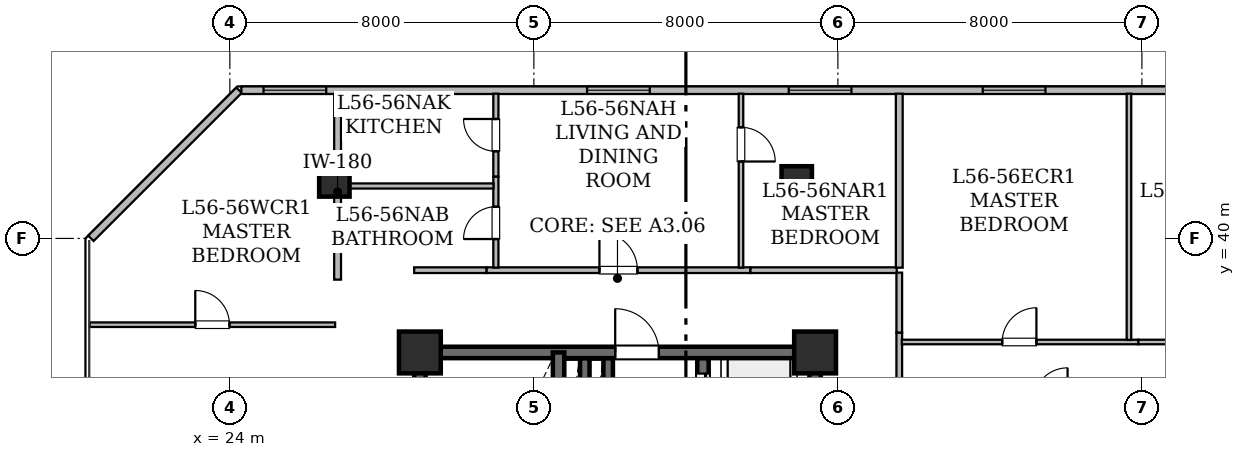
"""IFC4 building model, lengths in metres.
Left out: names, types, materials, properties, quantities, classifications, styles, units other than length and angle.
Written with IfcOpenShell. Run it as: python <this file> out.ifc"""

import sys

from ifc_helpers import new_model, si_unit, direction, frame, frame_2d, origin, origin_2d, place, context, subcontext, project, spatial, rectangle, hollow_rectangle, extrude, element, fill, save


model = new_model("IFC4")
c1 = context("Model", 3, precision=1e-05, world=origin(), true_north=direction((0.0, 1.0)))
c2 = subcontext(c1, "Body", "Model", "MODEL_VIEW")
j1 = project(units=[si_unit("LENGTHUNIT", "METRE"), si_unit("PLANEANGLEUNIT", "RADIAN")], contexts=[c1])
p1 = place(None, origin())
s1 = spatial("IfcSite", under=j1, at=p1, CompositionType="ELEMENT")
p2 = place(p1, origin())
s2 = spatial("IfcBuilding", under=s1, at=p2, CompositionType="ELEMENT")
p3 = place(p2, frame((0.0, 0.0, 220.85)))
s3 = spatial("IfcBuildingStorey", under=s2, at=p3, CompositionType="ELEMENT", Elevation=220.85)
for number, where, z_axis, x_axis in (
    (1, (29.0, 37.0, 0.0), (0.0, 0.0, 1.0), (1.0, 0.0, 0.0)),
    (2, (39.4, 37.0, 0.0), (0.0, 0.0, 1.0), (1.0, 0.0, 0.0)),
):
    element("IfcColumn", number, at=place(p3, frame(where, z_axis=z_axis, x_axis=x_axis)), inside=s3, PredefinedType="COLUMN", context=c2, shape_type="SweptSolid", body=[
        extrude(hollow_rectangle(XDim=1.1, YDim=1.1, WallThickness=0.055, at=origin_2d()), origin(), (0.0, 0.0, 1.0), 3.65),
    ])
for number, where, z_axis, x_axis in (
    (3, (26.75, 41.5, 0.0), (0.0, 0.0, 1.0), (1.0, 0.0, 0.0)),
    (4, (38.917, 41.5, 0.0), (0.0, 0.0, 1.0), (1.0, 0.0, 0.0)),
):
    element("IfcColumn", number, at=place(p3, frame(where, z_axis=z_axis, x_axis=x_axis)), inside=s3, PredefinedType="COLUMN", context=c2, shape_type="SweptSolid", body=[
        extrude(hollow_rectangle(XDim=0.8, YDim=0.8, WallThickness=0.04, at=origin_2d()), origin(), (0.0, 0.0, 1.0), 3.65),
    ])
p4 = place(p3, frame((20.344, 40.003, 0.0), z_axis=(0.0, 0.0, 1.0), x_axis=(0.707106781187, 0.707106781187, 0.0)))
e5 = element("IfcWall", 5, at=p4, inside=s3, PredefinedType="STANDARD", context=c2, shape_type="SweptSolid", body=[
    extrude(rectangle(XDim=5.511, YDim=0.2, at=frame_2d((2.756, 0.0))), origin(), (0.0, 0.0, 1.0), 3.43),
])
p5 = place(p3, frame((24.302, 43.9, 0.0), z_axis=(0.0, 0.0, 1.0), x_axis=(1.0, 0.0, 0.0)))
e6 = element("IfcWall", 6, at=p5, inside=s3, PredefinedType="STANDARD", context=c2, shape_type="SweptSolid", body=[
    extrude(rectangle(XDim=41.457, YDim=0.2, at=frame_2d((20.729, 0.0))), origin(), (0.0, 0.0, 1.0), 3.43),
])
p6 = place(p5, frame((0.584, 0.0, 0.85)))
e7 = element("IfcOpeningElement", 7, at=p6, cuts=e6, PredefinedType="OPENING", context=c2, shape_type="SweptSolid", body=[
    extrude(rectangle(XDim=1.65, YDim=1.55, at=frame_2d((0.825, 0.775))), frame((0.0, 0.11, 0.0), z_axis=(0.0, -1.0, 0.0), x_axis=(1.0, 0.0, 0.0)), (0.0, 0.0, 1.0), 0.22),
])
p7 = place(p5, frame((9.098, 0.0, 0.85)))
e8 = element("IfcOpeningElement", 8, at=p7, cuts=e6, PredefinedType="OPENING", context=c2, shape_type="SweptSolid", body=[
    extrude(rectangle(XDim=1.65, YDim=1.55, at=frame_2d((0.825, 0.775))), frame((0.0, 0.11, 0.0), z_axis=(0.0, -1.0, 0.0), x_axis=(1.0, 0.0, 0.0)), (0.0, 0.0, 1.0), 0.22),
])
p8 = place(p5, frame((14.405, 0.0, 0.85)))
e9 = element("IfcOpeningElement", 9, at=p8, cuts=e6, PredefinedType="OPENING", context=c2, shape_type="SweptSolid", body=[
    extrude(rectangle(XDim=1.65, YDim=1.55, at=frame_2d((0.825, 0.775))), frame((0.0, 0.11, 0.0), z_axis=(0.0, -1.0, 0.0), x_axis=(1.0, 0.0, 0.0)), (0.0, 0.0, 1.0), 0.22),
])
p9 = place(p5, frame((19.51, 0.0, 0.85)))
e10 = element("IfcOpeningElement", 10, at=p9, cuts=e6, PredefinedType="OPENING", context=c2, shape_type="SweptSolid", body=[
    extrude(rectangle(XDim=1.65, YDim=1.55, at=frame_2d((0.825, 0.775))), frame((0.0, 0.11, 0.0), z_axis=(0.0, -1.0, 0.0), x_axis=(1.0, 0.0, 0.0)), (0.0, 0.0, 1.0), 0.22),
])
p10 = place(p5, frame((25.992, 0.0, 0.85)))
e11 = element("IfcOpeningElement", 11, at=p10, cuts=e6, PredefinedType="OPENING", context=c2, shape_type="SweptSolid", body=[
    extrude(rectangle(XDim=1.65, YDim=1.55, at=frame_2d((0.825, 0.775))), frame((0.0, 0.11, 0.0), z_axis=(0.0, -1.0, 0.0), x_axis=(1.0, 0.0, 0.0)), (0.0, 0.0, 1.0), 0.22),
])
p11 = place(p5, frame((31.5, 0.0, 0.85)))
e12 = element("IfcOpeningElement", 12, at=p11, cuts=e6, PredefinedType="OPENING", context=c2, shape_type="SweptSolid", body=[
    extrude(rectangle(XDim=1.65, YDim=1.55, at=frame_2d((0.825, 0.775))), frame((0.0, 0.11, 0.0), z_axis=(0.0, -1.0, 0.0), x_axis=(1.0, 0.0, 0.0)), (0.0, 0.0, 1.0), 0.22),
])
p12 = place(p5, frame((36.066, 0.0, 0.85)))
e13 = element("IfcOpeningElement", 13, at=p12, cuts=e6, PredefinedType="OPENING", context=c2, shape_type="SweptSolid", body=[
    extrude(rectangle(XDim=1.65, YDim=1.55, at=frame_2d((0.825, 0.775))), frame((0.0, 0.11, 0.0), z_axis=(0.0, -1.0, 0.0), x_axis=(1.0, 0.0, 0.0)), (0.0, 0.0, 1.0), 0.22),
])
p13 = place(p3, frame((29.0, 28.0, 0.0), z_axis=(0.0, 0.0, 1.0), x_axis=(0.0, 1.0, 0.0)))
e14 = element("IfcWall", 14, at=p13, inside=s3, PredefinedType="SHEAR", context=c2, shape_type="SweptSolid", body=[
    extrude(rectangle(XDim=9.0, YDim=0.3, at=frame_2d((4.5, 0.0))), origin(), (0.0, 0.0, 1.0), 3.43),
])
p14 = place(p3, frame((29.0, 37.0, 0.0), z_axis=(0.0, 0.0, 1.0), x_axis=(1.0, 0.0, 0.0)))
e15 = element("IfcWall", 15, at=p14, inside=s3, PredefinedType="SHEAR", context=c2, shape_type="SweptSolid", body=[
    extrude(rectangle(XDim=10.4, YDim=0.3, at=frame_2d((5.2, 0.0))), origin(), (0.0, 0.0, 1.0), 3.43),
])
p15 = place(p14, frame((5.14, 0.0, 0.0)))
e16 = element("IfcOpeningElement", 16, at=p15, cuts=e15, PredefinedType="OPENING", context=c2, shape_type="SweptSolid", body=[
    extrude(rectangle(XDim=1.15, YDim=2.2, at=frame_2d((0.575, 1.1))), frame((0.0, 0.16, 0.0), z_axis=(0.0, -1.0, 0.0), x_axis=(1.0, 0.0, 0.0)), (0.0, 0.0, 1.0), 0.32),
])
p16 = place(p3, frame((39.4, 24.4, 0.0), z_axis=(0.0, 0.0, 1.0), x_axis=(0.0, 1.0, 0.0)))
e17 = element("IfcWall", 17, at=p16, inside=s3, PredefinedType="SHEAR", context=c2, shape_type="SweptSolid", body=[
    extrude(rectangle(XDim=12.6, YDim=0.3, at=frame_2d((6.3, 0.0))), origin(), (0.0, 0.0, 1.0), 3.43),
])
p17 = place(p3, frame((32.65, 28.0, 0.0), z_axis=(0.0, 0.0, 1.0), x_axis=(0.0, 1.0, 0.0)))
e18 = element("IfcWall", 18, at=p17, inside=s3, PredefinedType="SHEAR", context=c2, shape_type="SweptSolid", body=[
    extrude(rectangle(XDim=9.0, YDim=0.3, at=frame_2d((4.5, 0.0))), origin(), (0.0, 0.0, 1.0), 3.43),
])
p18 = place(p17, frame((0.72, 0.0, 0.0)))
e19 = element("IfcOpeningElement", 19, at=p18, cuts=e18, PredefinedType="OPENING", context=c2, shape_type="SweptSolid", body=[
    extrude(rectangle(XDim=1.0, YDim=2.15, at=frame_2d((0.5, 1.075))), frame((0.0, 0.16, 0.0), z_axis=(0.0, -1.0, 0.0), x_axis=(1.0, 0.0, 0.0)), (0.0, 0.0, 1.0), 0.32),
])
p19 = place(p3, frame((36.45, 31.3, 0.0), z_axis=(0.0, 0.0, 1.0), x_axis=(0.0, 1.0, 0.0)))
e20 = element("IfcWall", 20, at=p19, inside=s3, PredefinedType="SHEAR", context=c2, shape_type="SweptSolid", body=[
    extrude(rectangle(XDim=5.546, YDim=0.3, at=frame_2d((2.773, 0.0))), origin(), (0.0, 0.0, 1.0), 3.43),
])
p20 = place(p19, frame((0.12, 0.0, 0.0)))
e21 = element("IfcOpeningElement", 21, at=p20, cuts=e20, PredefinedType="OPENING", context=c2, shape_type="SweptSolid", body=[
    extrude(rectangle(XDim=1.05, YDim=2.15, at=frame_2d((0.525, 1.075))), frame((0.0, 0.16, 0.0), z_axis=(0.0, -1.0, 0.0), x_axis=(1.0, 0.0, 0.0)), (0.0, 0.0, 1.0), 0.32),
])
p21 = place(p19, frame((2.075, 0.0, 0.0)))
e22 = element("IfcOpeningElement", 22, at=p21, cuts=e20, PredefinedType="OPENING", context=c2, shape_type="SweptSolid", body=[
    extrude(rectangle(XDim=1.05, YDim=2.15, at=frame_2d((0.525, 1.075))), frame((0.0, 0.16, 0.0), z_axis=(0.0, -1.0, 0.0), x_axis=(1.0, 0.0, 0.0)), (0.0, 0.0, 1.0), 0.32),
])
p22 = place(p19, frame((4.095, 0.0, 0.0)))
e23 = element("IfcOpeningElement", 23, at=p22, cuts=e20, PredefinedType="OPENING", context=c2, shape_type="SweptSolid", body=[
    extrude(rectangle(XDim=1.05, YDim=2.15, at=frame_2d((0.525, 1.075))), frame((0.0, 0.16, 0.0), z_axis=(0.0, -1.0, 0.0), x_axis=(1.0, 0.0, 0.0)), (0.0, 0.0, 1.0), 0.32),
])
p23 = place(p3, frame((33.955, 34.025, 0.0), z_axis=(0.0, 0.0, 1.0), x_axis=(0.0, 1.0, 0.0)))
e24 = element("IfcWall", 24, at=p23, inside=s3, PredefinedType="SHEAR", context=c2, shape_type="SweptSolid", body=[
    extrude(rectangle(XDim=2.821, YDim=0.25, at=frame_2d((1.411, 0.0))), origin(), (0.0, 0.0, 1.0), 3.43),
])
p24 = place(p3, frame((33.34, 34.279, 0.0), z_axis=(0.0, 0.0, 1.0), x_axis=(0.0, 1.0, 0.0)))
e25 = element("IfcWall", 25, at=p24, inside=s3, PredefinedType="SHEAR", context=c2, shape_type="SweptSolid", body=[
    extrude(rectangle(XDim=2.567, YDim=0.25, at=frame_2d((1.283, 0.0))), origin(), (0.0, 0.0, 1.0), 3.43),
])
p25 = place(p3, frame((30.751, 39.165, 0.0), z_axis=(0.0, 0.0, 1.0), x_axis=(1.0, 0.0, 0.0)))
e26 = element("IfcWall", 26, at=p25, inside=s3, PredefinedType="STANDARD", context=c2, shape_type="SweptSolid", body=[
    extrude(rectangle(XDim=6.948, YDim=0.15, at=frame_2d((3.474, 0.0))), origin(), (0.0, 0.0, 1.0), 3.43),
])
p26 = place(p25, frame((2.974, 0.0, 0.0)))
e27 = element("IfcOpeningElement", 27, at=p26, cuts=e26, PredefinedType="OPENING", context=c2, shape_type="SweptSolid", body=[
    extrude(rectangle(XDim=1.0, YDim=2.15, at=frame_2d((0.5, 1.075))), frame((0.0, 0.085, 0.0), z_axis=(0.0, -1.0, 0.0), x_axis=(1.0, 0.0, 0.0)), (0.0, 0.0, 1.0), 0.17),
])
p27 = place(p3, frame((28.85, 39.165, 0.0), z_axis=(0.0, 0.0, 1.0), x_axis=(1.0, 0.0, 0.0)))
e28 = element("IfcWall", 28, at=p27, inside=s3, PredefinedType="STANDARD", context=c2, shape_type="SweptSolid", body=[
    extrude(rectangle(XDim=1.901, YDim=0.15, at=frame_2d((0.95, 0.0))), origin(), (0.0, 0.0, 1.0), 3.43),
])
p28 = place(p3, frame((37.699, 39.165, 0.0), z_axis=(0.0, 0.0, 1.0), x_axis=(1.0, 0.0, 0.0)))
e29 = element("IfcWall", 29, at=p28, inside=s3, PredefinedType="STANDARD", context=c2, shape_type="SweptSolid", body=[
    extrude(rectangle(XDim=3.851, YDim=0.15, at=frame_2d((1.926, 0.0))), origin(), (0.0, 0.0, 1.0), 2.725),
])
p29 = place(p3, frame((41.615, 37.524, 0.0), z_axis=(0.0, 0.0, 1.0), x_axis=(0.0, -1.0, 0.0)))
e30 = element("IfcWall", 30, at=p29, inside=s3, PredefinedType="STANDARD", context=c2, shape_type="SweptSolid", body=[
    extrude(rectangle(XDim=1.58, YDim=0.15, at=frame_2d((0.79, 0.0))), origin(), (0.0, 0.0, 1.0), 2.725),
])
p30 = place(p3, frame((41.615, 39.1, 0.0), z_axis=(0.0, 0.0, 1.0), x_axis=(0.0, -1.0, 0.0)))
e31 = element("IfcWall", 31, at=p30, inside=s3, PredefinedType="STANDARD", context=c2, shape_type="SweptSolid", body=[
    extrude(rectangle(XDim=1.576, YDim=0.15, at=frame_2d((0.788, 0.0))), origin(), (0.0, 0.0, 1.0), 2.725),
])
p31 = place(p3, frame((20.31, 37.73, 0.0), z_axis=(0.0, 0.0, 1.0), x_axis=(1.0, 0.0, 0.0)))
e32 = element("IfcWall", 32, at=p31, inside=s3, PredefinedType="PARTITIONING", context=c2, shape_type="SweptSolid", body=[
    extrude(rectangle(XDim=6.46, YDim=0.12, at=frame_2d((3.23, 0.0))), origin(), (0.0, 0.0, 1.0), 2.887),
])
p32 = place(p31, frame((2.78, 0.0, 0.0)))
e33 = element("IfcOpeningElement", 33, at=p32, cuts=e32, PredefinedType="OPENING", context=c2, shape_type="SweptSolid", body=[
    extrude(rectangle(XDim=0.9, YDim=2.1, at=frame_2d((0.45, 1.05))), frame((0.0, 0.07, 0.0), z_axis=(0.0, -1.0, 0.0), x_axis=(1.0, 0.0, 0.0)), (0.0, 0.0, 1.0), 0.14),
])
p33 = place(p3, frame((26.835, 41.629, 0.0), z_axis=(0.0, 0.0, 1.0), x_axis=(0.0, -1.0, 0.0)))
e34 = element("IfcWall", 34, at=p33, inside=s3, PredefinedType="STANDARD", context=c2, shape_type="SweptSolid", body=[
    extrude(rectangle(XDim=2.713, YDim=0.18, at=frame_2d((1.356, 0.0))), origin(), (0.0, 0.0, 1.0), 2.725),
])
p34 = place(p3, frame((26.835, 43.808, 0.0), z_axis=(0.0, 0.0, 1.0), x_axis=(0.0, -1.0, 0.0)))
e35 = element("IfcWall", 35, at=p34, inside=s3, PredefinedType="STANDARD", context=c2, shape_type="SweptSolid", body=[
    extrude(rectangle(XDim=2.179, YDim=0.18, at=frame_2d((1.09, 0.0))), origin(), (0.0, 0.0, 1.0), 2.725),
])
p35 = place(p3, frame((31.0, 39.232, 0.0), z_axis=(0.0, 0.0, 1.0), x_axis=(0.0, 1.0, 0.0)))
e36 = element("IfcWall", 36, at=p35, inside=s3, PredefinedType="PARTITIONING", context=c2, shape_type="SweptSolid", body=[
    extrude(rectangle(XDim=2.397, YDim=0.135, at=frame_2d((1.198, 0.0))), origin(), (0.0, 0.0, 1.0), 2.887),
])
p36 = place(p35, frame((0.752, 0.0, 0.0)))
e37 = element("IfcOpeningElement", 37, at=p36, cuts=e36, PredefinedType="OPENING", context=c2, shape_type="SweptSolid", body=[
    extrude(rectangle(XDim=0.85, YDim=2.1, at=frame_2d((0.425, 1.05))), frame((0.0, 0.077, 0.0), z_axis=(0.0, -1.0, 0.0), x_axis=(1.0, 0.0, 0.0)), (0.0, 0.0, 1.0), 0.155),
])
p37 = place(p3, frame((31.0, 41.629, 0.0), z_axis=(0.0, 0.0, 1.0), x_axis=(0.0, 1.0, 0.0)))
e38 = element("IfcWall", 38, at=p37, inside=s3, PredefinedType="PARTITIONING", context=c2, shape_type="SweptSolid", body=[
    extrude(rectangle(XDim=2.179, YDim=0.135, at=frame_2d((1.09, 0.0))), origin(), (0.0, 0.0, 1.0), 3.43),
])
p38 = place(p37, frame((0.664, 0.0, 0.0)))
e39 = element("IfcOpeningElement", 39, at=p38, cuts=e38, PredefinedType="OPENING", context=c2, shape_type="SweptSolid", body=[
    extrude(rectangle(XDim=0.85, YDim=2.1, at=frame_2d((0.425, 1.05))), frame((0.0, 0.077, 0.0), z_axis=(0.0, -1.0, 0.0), x_axis=(1.0, 0.0, 0.0)), (0.0, 0.0, 1.0), 0.155),
])
p39 = place(p3, frame((37.45, 43.808, 0.0), z_axis=(0.0, 0.0, 1.0), x_axis=(0.0, -1.0, 0.0)))
e40 = element("IfcWall", 40, at=p39, inside=s3, PredefinedType="PARTITIONING", context=c2, shape_type="SweptSolid", body=[
    extrude(rectangle(XDim=4.576, YDim=0.12, at=frame_2d((2.288, 0.0))), origin(), (0.0, 0.0, 1.0), 2.887),
])
p40 = place(p39, frame((0.884, 0.0, 0.0)))
e41 = element("IfcOpeningElement", 41, at=p40, cuts=e40, PredefinedType="OPENING", context=c2, shape_type="SweptSolid", body=[
    extrude(rectangle(XDim=0.9, YDim=2.1, at=frame_2d((0.45, 1.05))), frame((0.0, 0.07, 0.0), z_axis=(0.0, -1.0, 0.0), x_axis=(1.0, 0.0, 0.0)), (0.0, 0.0, 1.0), 0.14),
])
p41 = place(p3, frame((26.917, 41.38, 0.0), z_axis=(0.0, 0.0, 1.0), x_axis=(1.0, 0.0, 0.0)))
e42 = element("IfcWall", 42, at=p41, inside=s3, PredefinedType="PARTITIONING", context=c2, shape_type="SweptSolid", body=[
    extrude(rectangle(XDim=4.022, YDim=0.135, at=frame_2d((2.011, 0.0))), origin(), (0.0, 0.0, 1.0), 2.725),
])
p42 = place(p3, frame((41.615, 43.808, 0.0), z_axis=(0.0, 0.0, 1.0), x_axis=(0.0, -1.0, 0.0)))
e43 = element("IfcWall", 43, at=p42, inside=s3, PredefinedType="STANDARD", context=c2, shape_type="SweptSolid", body=[
    extrude(rectangle(XDim=4.578, YDim=0.18, at=frame_2d((2.289, 0.0))), origin(), (0.0, 0.0, 1.0), 2.887),
])
p43 = place(p3, frame((41.682, 37.275, 0.0), z_axis=(0.0, 0.0, 1.0), x_axis=(1.0, 0.0, 0.0)))
e44 = element("IfcWall", 44, at=p43, inside=s3, PredefinedType="PARTITIONING", context=c2, shape_type="SweptSolid", body=[
    extrude(rectangle(XDim=6.226, YDim=0.12, at=frame_2d((3.113, 0.0))), origin(), (0.0, 0.0, 1.0), 2.725),
])
p44 = place(p43, frame((2.642, 0.0, 0.0)))
e45 = element("IfcOpeningElement", 45, at=p44, cuts=e44, PredefinedType="OPENING", context=c2, shape_type="SweptSolid", body=[
    extrude(rectangle(XDim=0.9, YDim=2.1, at=frame_2d((0.45, 1.05))), frame((0.0, 0.07, 0.0), z_axis=(0.0, -1.0, 0.0), x_axis=(1.0, 0.0, 0.0)), (0.0, 0.0, 1.0), 0.14),
])
p45 = place(p3, frame((47.908, 37.275, 0.0), z_axis=(0.0, 0.0, 1.0), x_axis=(1.0, 0.0, 0.0)))
e46 = element("IfcWall", 46, at=p45, inside=s3, PredefinedType="PARTITIONING", context=c2, shape_type="SweptSolid", body=[
    extrude(rectangle(XDim=6.921, YDim=0.12, at=frame_2d((3.46, 0.0))), origin(), (0.0, 0.0, 1.0), 2.725),
])
p46 = place(p45, frame((2.989, 0.0, 0.0)))
e47 = element("IfcOpeningElement", 47, at=p46, cuts=e46, PredefinedType="OPENING", context=c2, shape_type="SweptSolid", body=[
    extrude(rectangle(XDim=0.9, YDim=2.1, at=frame_2d((0.45, 1.05))), frame((0.0, 0.07, 0.0), z_axis=(0.0, -1.0, 0.0), x_axis=(1.0, 0.0, 0.0)), (0.0, 0.0, 1.0), 0.14),
])
p47 = place(p3, frame((47.659, 43.808, 0.0), z_axis=(0.0, 0.0, 1.0), x_axis=(0.0, -1.0, 0.0)))
e48 = element("IfcWall", 48, at=p47, inside=s3, PredefinedType="PARTITIONING", context=c2, shape_type="SweptSolid", body=[
    extrude(rectangle(XDim=6.479, YDim=0.12, at=frame_2d((3.24, 0.0))), origin(), (0.0, 0.0, 1.0), 2.725),
])
p48 = place(p6, origin())
e49 = element("IfcWindow", 49, at=p48, inside=s3, PartitioningType="SINGLE_PANEL", PredefinedType="WINDOW", context=c2, shape_type="SweptSolid", body=[
    extrude(rectangle(XDim=1.65, YDim=1.55, at=frame_2d((0.825, 0.775))), frame((0.0, 0.03, 0.0), z_axis=(0.0, -1.0, 0.0), x_axis=(1.0, 0.0, 0.0)), (0.0, 0.0, 1.0), 0.06),
])
fill(e7, e49)
p49 = place(p7, origin())
e50 = element("IfcWindow", 50, at=p49, inside=s3, PartitioningType="SINGLE_PANEL", PredefinedType="WINDOW", context=c2, shape_type="SweptSolid", body=[
    extrude(rectangle(XDim=1.65, YDim=1.55, at=frame_2d((0.825, 0.775))), frame((0.0, 0.03, 0.0), z_axis=(0.0, -1.0, 0.0), x_axis=(1.0, 0.0, 0.0)), (0.0, 0.0, 1.0), 0.06),
])
fill(e8, e50)
p50 = place(p8, origin())
e51 = element("IfcWindow", 51, at=p50, inside=s3, PartitioningType="SINGLE_PANEL", PredefinedType="WINDOW", context=c2, shape_type="SweptSolid", body=[
    extrude(rectangle(XDim=1.65, YDim=1.55, at=frame_2d((0.825, 0.775))), frame((0.0, 0.03, 0.0), z_axis=(0.0, -1.0, 0.0), x_axis=(1.0, 0.0, 0.0)), (0.0, 0.0, 1.0), 0.06),
])
fill(e9, e51)
p51 = place(p9, origin())
e52 = element("IfcWindow", 52, at=p51, inside=s3, PartitioningType="SINGLE_PANEL", PredefinedType="WINDOW", context=c2, shape_type="SweptSolid", body=[
    extrude(rectangle(XDim=1.65, YDim=1.55, at=frame_2d((0.825, 0.775))), frame((0.0, 0.03, 0.0), z_axis=(0.0, -1.0, 0.0), x_axis=(1.0, 0.0, 0.0)), (0.0, 0.0, 1.0), 0.06),
])
fill(e10, e52)
p52 = place(p15, origin())
e53 = element("IfcDoor", 53, at=p52, inside=s3, OperationType="SINGLE_SWING_LEFT", PredefinedType="DOOR", context=c2, shape_type="SweptSolid", body=[
    extrude(rectangle(XDim=1.15, YDim=2.2, at=frame_2d((0.575, 1.1))), frame((0.0, 0.025, 0.0), z_axis=(0.0, -1.0, 0.0), x_axis=(1.0, 0.0, 0.0)), (0.0, 0.0, 1.0), 0.05),
])
fill(e16, e53)
p53 = place(p22, origin())
e54 = element("IfcDoor", 54, at=p53, inside=s3, OperationType="SLIDING_TO_LEFT", PredefinedType="DOOR", context=c2, shape_type="SweptSolid", body=[
    extrude(rectangle(XDim=1.05, YDim=2.15, at=frame_2d((0.525, 1.075))), frame((0.0, 0.025, 0.0), z_axis=(0.0, -1.0, 0.0), x_axis=(1.0, 0.0, 0.0)), (0.0, 0.0, 1.0), 0.05),
])
fill(e23, e54)
p54 = place(p26, origin())
e55 = element("IfcDoor", 55, at=p54, inside=s3, OperationType="SINGLE_SWING_LEFT", PredefinedType="DOOR", context=c2, shape_type="SweptSolid", body=[
    extrude(rectangle(XDim=1.0, YDim=2.15, at=frame_2d((0.5, 1.075))), frame((0.0, 0.025, 0.0), z_axis=(0.0, -1.0, 0.0), x_axis=(1.0, 0.0, 0.0)), (0.0, 0.0, 1.0), 0.05),
])
fill(e27, e55)
p55 = place(p32, origin())
e56 = element("IfcDoor", 56, at=p55, inside=s3, OperationType="SINGLE_SWING_LEFT", PredefinedType="DOOR", context=c2, shape_type="SweptSolid", body=[
    extrude(rectangle(XDim=0.9, YDim=2.1, at=frame_2d((0.45, 1.05))), frame((0.0, 0.025, 0.0), z_axis=(0.0, -1.0, 0.0), x_axis=(1.0, 0.0, 0.0)), (0.0, 0.0, 1.0), 0.05),
])
fill(e33, e56)
p56 = place(p36, origin())
e57 = element("IfcDoor", 57, at=p56, inside=s3, OperationType="SINGLE_SWING_LEFT", PredefinedType="DOOR", context=c2, shape_type="SweptSolid", body=[
    extrude(rectangle(XDim=0.85, YDim=2.1, at=frame_2d((0.425, 1.05))), frame((0.0, 0.025, 0.0), z_axis=(0.0, -1.0, 0.0), x_axis=(1.0, 0.0, 0.0)), (0.0, 0.0, 1.0), 0.05),
])
fill(e37, e57)
p57 = place(p38, origin())
e58 = element("IfcDoor", 58, at=p57, inside=s3, OperationType="SINGLE_SWING_RIGHT", PredefinedType="DOOR", context=c2, shape_type="SweptSolid", body=[
    extrude(rectangle(XDim=0.85, YDim=2.1, at=frame_2d((0.425, 1.05))), frame((0.0, 0.025, 0.0), z_axis=(0.0, -1.0, 0.0), x_axis=(1.0, 0.0, 0.0)), (0.0, 0.0, 1.0), 0.05),
])
fill(e39, e58)
p58 = place(p40, origin())
e59 = element("IfcDoor", 59, at=p58, inside=s3, OperationType="SINGLE_SWING_RIGHT", PredefinedType="DOOR", context=c2, shape_type="SweptSolid", body=[
    extrude(rectangle(XDim=0.9, YDim=2.1, at=frame_2d((0.45, 1.05))), frame((0.0, 0.025, 0.0), z_axis=(0.0, -1.0, 0.0), x_axis=(1.0, 0.0, 0.0)), (0.0, 0.0, 1.0), 0.05),
])
fill(e41, e59)
p59 = place(p44, origin())
e60 = element("IfcDoor", 60, at=p59, inside=s3, OperationType="SINGLE_SWING_RIGHT", PredefinedType="DOOR", context=c2, shape_type="SweptSolid", body=[
    extrude(rectangle(XDim=0.9, YDim=2.1, at=frame_2d((0.45, 1.05))), frame((0.0, 0.025, 0.0), z_axis=(0.0, -1.0, 0.0), x_axis=(1.0, 0.0, 0.0)), (0.0, 0.0, 1.0), 0.05),
])
fill(e45, e60)
save(model, sys.argv[1])
